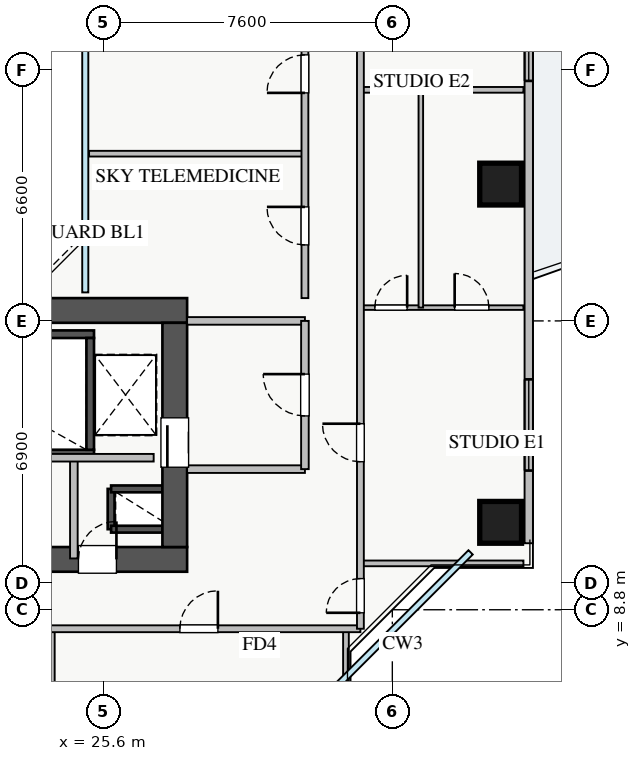
"""IFC4 building model, lengths in metres.
Left out: names, types, materials, properties, quantities, classifications, styles, units other than length and angle.
Written with IfcOpenShell. Run it as: python <this file> out.ifc"""

import sys

from ifc_helpers import new_model, si_unit, direction, frame, frame_2d, origin, origin_2d, place, context, subcontext, project, spatial, rectangle, extrude, source, transform, mapped, element, fill, save


model = new_model("IFC4")
c1 = context("Model", 3, precision=1e-05, world=origin(), true_north=direction((0.0, 1.0)))
c2 = subcontext(c1, "Body", "Model", "MODEL_VIEW")
j1 = project(units=[si_unit("LENGTHUNIT", "METRE"), si_unit("PLANEANGLEUNIT", "RADIAN")], contexts=[c1])
p1 = place(None, origin())
s1 = spatial("IfcSite", under=j1, at=p1, CompositionType="ELEMENT")
p2 = place(p1, origin())
s2 = spatial("IfcBuilding", under=s1, at=p2, CompositionType="ELEMENT")
p3 = place(p2, frame((0.0, 0.0, 106.75)))
s3 = spatial("IfcBuildingStorey", under=s2, at=p3, CompositionType="ELEMENT", Elevation=106.75)
p4 = place(p3, frame((25.8, 10.92, 0.0), z_axis=(0.0, 0.0, 1.0), x_axis=(0.0, 1.0, 0.0)))
e1 = element("IfcWall", 1, at=p4, inside=s3, PredefinedType="SHEAR", context=c2, shape_type="SweptSolid", body=[
    extrude(rectangle(XDim=1.06, YDim=0.18, at=frame_2d((0.53, 0.0))), origin(), (0.0, 0.0, 1.0), 3.07),
])
for number, where, z_axis, x_axis in (
    (2, (25.8, 11.98, 0.0), (0.0, 0.0, 1.0), (1.0, 0.0, 0.0)),
    (3, (25.8, 10.92, 0.0), (0.0, 0.0, 1.0), (1.0, 0.0, 0.0)),
):
    element("IfcWall", number, at=place(p3, frame(where, z_axis=z_axis, x_axis=x_axis)), inside=s3, PredefinedType="SHEAR", context=c2, shape_type="SweptSolid", body=[
        extrude(rectangle(XDim=1.35, YDim=0.18, at=frame_2d((0.675, 0.0))), origin(), (0.0, 0.0, 1.0), 3.07),
    ])
p5 = place(p3, frame((18.2, 12.91, 0.0), z_axis=(0.0, 0.0, 1.0), x_axis=(1.0, 0.0, 0.0)))
e4 = element("IfcWall", 4, at=p5, inside=s3, PredefinedType="SHEAR", context=c2, shape_type="SweptSolid", body=[
    extrude(rectangle(XDim=7.15, YDim=0.2, at=frame_2d((3.575, 0.0))), origin(), (0.0, 0.0, 1.0), 3.25),
])
p6 = place(p5, frame((0.35, 0.0, 0.0)))
e5 = element("IfcOpeningElement", 5, at=p6, cuts=e4, PredefinedType="OPENING", context=c2, shape_type="SweptSolid", body=[
    extrude(rectangle(XDim=1.1, YDim=2.05, at=frame_2d((0.55, 1.025))), frame((0.0, 0.11, 0.0), z_axis=(0.0, -1.0, 0.0), x_axis=(1.0, 0.0, 0.0)), (0.0, 0.0, 1.0), 0.22),
])
p7 = place(p3, frame((18.2, 16.05, 0.0), z_axis=(0.0, 0.0, 1.0), x_axis=(1.0, 0.0, 0.0)))
e6 = element("IfcWall", 6, at=p7, inside=s3, PredefinedType="SHEAR", context=c2, shape_type="SweptSolid", body=[
    extrude(rectangle(XDim=7.15, YDim=0.2, at=frame_2d((3.575, 0.0))), origin(), (0.0, 0.0, 1.0), 3.25),
])
p8 = place(p3, frame((25.25, 13.01, 0.0), z_axis=(0.0, 0.0, 1.0), x_axis=(0.0, 1.0, 0.0)))
e7 = element("IfcWall", 7, at=p8, inside=s3, PredefinedType="SHEAR", context=c2, shape_type="SweptSolid", body=[
    extrude(rectangle(XDim=2.94, YDim=0.2, at=frame_2d((1.47, 0.0))), origin(), (0.0, 0.0, 1.0), 3.25),
])
p9 = place(p3, frame((10.2, 10.125, 0.0), z_axis=(0.0, 0.0, 1.0), x_axis=(1.0, 0.0, 0.0)))
e8 = element("IfcWall", 8, at=p9, inside=s3, PredefinedType="SHEAR", context=c2, shape_type="SweptSolid", body=[
    extrude(rectangle(XDim=17.6, YDim=0.65, at=frame_2d((8.8, 0.0))), origin(), (0.0, 0.0, 1.0), 3.25),
])
p10 = place(p9, frame((1.15, 0.0, 0.0)))
e9 = element("IfcOpeningElement", 9, at=p10, cuts=e8, PredefinedType="OPENING", context=c2, shape_type="SweptSolid", body=[
    extrude(rectangle(XDim=1.1, YDim=2.05, at=frame_2d((0.55, 1.025))), frame((0.0, 0.335, 0.0), z_axis=(0.0, -1.0, 0.0), x_axis=(1.0, 0.0, 0.0)), (0.0, 0.0, 1.0), 0.67),
])
p11 = place(p9, frame((8.3, 0.0, 0.0)))
e10 = element("IfcOpeningElement", 10, at=p11, cuts=e8, PredefinedType="OPENING", context=c2, shape_type="SweptSolid", body=[
    extrude(rectangle(XDim=1.1, YDim=2.05, at=frame_2d((0.55, 1.025))), frame((0.0, 0.335, 0.0), z_axis=(0.0, -1.0, 0.0), x_axis=(1.0, 0.0, 0.0)), (0.0, 0.0, 1.0), 0.67),
])
p12 = place(p9, frame((4.9, 0.0, 0.0)))
e11 = element("IfcOpeningElement", 11, at=p12, cuts=e8, PredefinedType="OPENING", context=c2, shape_type="SweptSolid", body=[
    extrude(rectangle(XDim=1.1, YDim=2.05, at=frame_2d((0.55, 1.025))), frame((0.0, 0.335, 0.0), z_axis=(0.0, -1.0, 0.0), x_axis=(1.0, 0.0, 0.0)), (0.0, 0.0, 1.0), 0.67),
])
p13 = place(p9, frame((14.74, 0.0, 0.0)))
e12 = element("IfcOpeningElement", 12, at=p13, cuts=e8, PredefinedType="OPENING", context=c2, shape_type="SweptSolid", body=[
    extrude(rectangle(XDim=1.0, YDim=2.05, at=frame_2d((0.5, 1.025))), frame((0.0, 0.335, 0.0), z_axis=(0.0, -1.0, 0.0), x_axis=(1.0, 0.0, 0.0)), (0.0, 0.0, 1.0), 0.67),
])
p14 = place(p9, frame((11.67, 0.0, 0.0)))
e13 = element("IfcOpeningElement", 13, at=p14, cuts=e8, PredefinedType="OPENING", context=c2, shape_type="SweptSolid", body=[
    extrude(rectangle(XDim=1.0, YDim=2.05, at=frame_2d((0.5, 1.025))), frame((0.0, 0.335, 0.0), z_axis=(0.0, -1.0, 0.0), x_axis=(1.0, 0.0, 0.0)), (0.0, 0.0, 1.0), 0.67),
])
p15 = place(p3, frame((10.2, 16.675, 0.0), z_axis=(0.0, 0.0, 1.0), x_axis=(1.0, 0.0, 0.0)))
e14 = element("IfcWall", 14, at=p15, inside=s3, PredefinedType="SHEAR", context=c2, shape_type="SweptSolid", body=[
    extrude(rectangle(XDim=17.6, YDim=0.65, at=frame_2d((8.8, 0.0))), origin(), (0.0, 0.0, 1.0), 3.25),
])
p16 = place(p3, frame((27.475, 10.45, 0.0), z_axis=(0.0, 0.0, 1.0), x_axis=(0.0, 1.0, 0.0)))
e15 = element("IfcWall", 15, at=p16, inside=s3, PredefinedType="SHEAR", context=c2, shape_type="SweptSolid", body=[
    extrude(rectangle(XDim=5.9, YDim=0.65, at=frame_2d((2.95, 0.0))), origin(), (0.0, 0.0, 1.0), 3.25),
])
p17 = place(p16, frame((2.1, 0.0, 0.0)))
e16 = element("IfcOpeningElement", 16, at=p17, cuts=e15, PredefinedType="OPENING", context=c2, shape_type="SweptSolid", body=[
    extrude(rectangle(XDim=1.3, YDim=2.05, at=frame_2d((0.65, 1.025))), frame((0.0, 0.335, 0.0), z_axis=(0.0, -1.0, 0.0), x_axis=(1.0, 0.0, 0.0)), (0.0, 0.0, 1.0), 0.67),
])
m1 = source(origin(), c2, "Body", "SweptSolid", [
    extrude(rectangle(XDim=1.1, YDim=1.1, at=origin_2d()), origin(), (0.0, 0.0, 1.0), 3.25),
])
for number, where, z_axis, x_axis in (
    (17, (36.05, 11.1, 0.0), (0.0, 0.0, 1.0), (1.0, 0.0, 0.0)),
    (18, (36.05, 20.0, 0.0), (0.0, 0.0, 1.0), (1.0, 0.0, 0.0)),
):
    element("IfcColumn", number, at=place(p3, frame(where, z_axis=z_axis, x_axis=x_axis)), inside=s3, PredefinedType="COLUMN", context=c2, shape_type="MappedRepresentation", body=[
        mapped(m1, transform((0.0, 0.0, 0.0), x_axis=(1.0, 0.0, 0.0), y_axis=(0.0, 1.0, 0.0), z_axis=(0.0, 0.0, 1.0), scale=1.0)),
    ])
p18 = place(p3, frame((36.79, 10.55, 0.0), z_axis=(0.0, 0.0, 1.0), x_axis=(0.0, 1.0, 0.0)))
e19 = element("IfcWall", 19, at=p18, inside=s3, PredefinedType="STANDARD", context=c2, shape_type="SweptSolid", body=[
    extrude(rectangle(XDim=24.9, YDim=0.22, at=frame_2d((12.45, 0.0))), origin(), (0.0, 0.0, 1.0), 2.61),
])
p19 = place(p18, frame((13.3, 0.0, 0.0)))
e20 = element("IfcOpeningElement", 20, at=p19, cuts=e19, PredefinedType="OPENING", context=c2, shape_type="SweptSolid", body=[
    extrude(rectangle(XDim=1.2, YDim=2.1, at=frame_2d((0.6, 1.05))), frame((0.0, 0.12, 0.0), z_axis=(0.0, -1.0, 0.0), x_axis=(1.0, 0.0, 0.0)), (0.0, 0.0, 1.0), 0.24),
])
p20 = place(p18, frame((1.912, 0.0, 0.9)))
e21 = element("IfcOpeningElement", 21, at=p20, cuts=e19, PredefinedType="OPENING", context=c2, shape_type="SweptSolid", body=[
    extrude(rectangle(XDim=2.4, YDim=1.48, at=frame_2d((1.2, 0.74))), frame((0.0, 0.12, 0.0), z_axis=(0.0, -1.0, 0.0), x_axis=(1.0, 0.0, 0.0)), (0.0, 0.0, 1.0), 0.24),
])
p21 = place(p18, frame((20.737, 0.0, 0.9)))
e22 = element("IfcOpeningElement", 22, at=p21, cuts=e19, PredefinedType="OPENING", context=c2, shape_type="SweptSolid", body=[
    extrude(rectangle(XDim=2.1, YDim=1.48, at=frame_2d((1.05, 0.74))), frame((0.0, 0.12, 0.0), z_axis=(0.0, -1.0, 0.0), x_axis=(1.0, 0.0, 0.0)), (0.0, 0.0, 1.0), 0.24),
])
p22 = place(p18, frame((12.165, 0.0, 0.9)))
e23 = element("IfcOpeningElement", 23, at=p22, cuts=e19, PredefinedType="OPENING", context=c2, shape_type="SweptSolid", body=[
    extrude(rectangle(XDim=0.9, YDim=1.2, at=frame_2d((0.45, 0.6))), frame((0.0, 0.12, 0.0), z_axis=(0.0, -1.0, 0.0), x_axis=(1.0, 0.0, 0.0)), (0.0, 0.0, 1.0), 0.24),
])
for number, where, z_axis, x_axis in (
    (24, (27.8, 16.4, 0.0), (0.0, 0.0, 1.0), (1.0, 0.0, 0.0)),
    (25, (27.8, 12.5, 0.0), (0.0, 0.0, 1.0), (1.0, 0.0, 0.0)),
):
    element("IfcWall", number, at=place(p3, frame(where, z_axis=z_axis, x_axis=x_axis)), inside=s3, PredefinedType="PARTITIONING", context=c2, shape_type="SweptSolid", body=[
        extrude(rectangle(XDim=3.1, YDim=0.2, at=frame_2d((1.55, 0.0))), origin(), (0.0, 0.0, 1.0), 3.07),
    ])
p23 = place(p3, frame((30.9, 12.5, 0.0), z_axis=(0.0, 0.0, 1.0), x_axis=(0.0, 1.0, 0.0)))
e26 = element("IfcWall", 26, at=p23, inside=s3, PredefinedType="PARTITIONING", context=c2, shape_type="SweptSolid", body=[
    extrude(rectangle(XDim=3.9, YDim=0.2, at=frame_2d((1.95, 0.0))), origin(), (0.0, 0.0, 1.0), 3.07),
])
p24 = place(p23, frame((1.4, 0.0, 0.0)))
e27 = element("IfcOpeningElement", 27, at=p24, cuts=e26, PredefinedType="OPENING", context=c2, shape_type="SweptSolid", body=[
    extrude(rectangle(XDim=1.1, YDim=2.05, at=frame_2d((0.55, 1.025))), frame((0.0, 0.11, 0.0), z_axis=(0.0, -1.0, 0.0), x_axis=(1.0, 0.0, 0.0)), (0.0, 0.0, 1.0), 0.22),
])
p25 = place(p3, frame((24.82, 10.15, 0.0), z_axis=(0.0, 0.0, 1.0), x_axis=(0.0, 1.0, 0.0)))
e28 = element("IfcWall", 28, at=p25, inside=s3, PredefinedType="PARTITIONING", context=c2, shape_type="SweptSolid", body=[
    extrude(rectangle(XDim=2.65, YDim=0.2, at=frame_2d((1.325, 0.0))), origin(), (0.0, 0.0, 1.0), 3.07),
])
p26 = place(p3, frame((21.75, 12.8, 0.0), z_axis=(0.0, 0.0, 1.0), x_axis=(1.0, 0.0, 0.0)))
e29 = element("IfcWall", 29, at=p26, inside=s3, PredefinedType="PARTITIONING", context=c2, shape_type="SweptSolid", body=[
    extrude(rectangle(XDim=5.17, YDim=0.2, at=frame_2d((2.585, 0.0))), origin(), (0.0, 0.0, 1.0), 3.07),
])
for number, where, z_axis, x_axis in (
    (30, (24.24, 5.35, 0.0), (0.0, 0.0, 1.0), (0.0, 1.0, 0.0)),
    (31, (31.98, 5.35, 0.0), (0.0, 0.0, 1.0), (0.0, 1.0, 0.0)),
):
    element("IfcWall", number, at=place(p3, frame(where, z_axis=z_axis, x_axis=x_axis)), inside=s3, PredefinedType="PARTITIONING", context=c2, shape_type="SweptSolid", body=[
        extrude(rectangle(XDim=2.95, YDim=0.15, at=frame_2d((1.475, 0.0))), origin(), (0.0, 0.0, 1.0), 3.07),
    ])
p27 = place(p3, frame((8.75, 8.3, 0.0), z_axis=(0.0, 0.0, 1.0), x_axis=(1.0, 0.0, 0.0)))
e32 = element("IfcWall", 32, at=p27, inside=s3, PredefinedType="PARTITIONING", context=c2, shape_type="SweptSolid", body=[
    extrude(rectangle(XDim=23.61, YDim=0.18, at=frame_2d((11.805, 0.0))), origin(), (0.0, 0.0, 1.0), 3.07),
])
p28 = place(p27, frame((3.37, 0.0, 0.0)))
e33 = element("IfcOpeningElement", 33, at=p28, cuts=e32, PredefinedType="OPENING", context=c2, shape_type="SweptSolid", body=[
    extrude(rectangle(XDim=1.0, YDim=2.05, at=frame_2d((0.5, 1.025))), frame((0.0, 0.1, 0.0), z_axis=(0.0, -1.0, 0.0), x_axis=(1.0, 0.0, 0.0)), (0.0, 0.0, 1.0), 0.2),
])
p29 = place(p27, frame((11.115, 0.0, 0.0)))
e34 = element("IfcOpeningElement", 34, at=p29, cuts=e32, PredefinedType="OPENING", context=c2, shape_type="SweptSolid", body=[
    extrude(rectangle(XDim=1.0, YDim=2.05, at=frame_2d((0.5, 1.025))), frame((0.0, 0.1, 0.0), z_axis=(0.0, -1.0, 0.0), x_axis=(1.0, 0.0, 0.0)), (0.0, 0.0, 1.0), 0.2),
])
p30 = place(p27, frame((18.86, 0.0, 0.0)))
e35 = element("IfcOpeningElement", 35, at=p30, cuts=e32, PredefinedType="OPENING", context=c2, shape_type="SweptSolid", body=[
    extrude(rectangle(XDim=1.0, YDim=2.05, at=frame_2d((0.5, 1.025))), frame((0.0, 0.1, 0.0), z_axis=(0.0, -1.0, 0.0), x_axis=(1.0, 0.0, 0.0)), (0.0, 0.0, 1.0), 0.2),
])
p31 = place(p3, frame((32.36, 10.02, 0.0), z_axis=(0.0, 0.0, 1.0), x_axis=(1.0, 0.0, 0.0)))
e36 = element("IfcWall", 36, at=p31, inside=s3, PredefinedType="PARTITIONING", context=c2, shape_type="SweptSolid", body=[
    extrude(rectangle(XDim=4.29, YDim=0.15, at=frame_2d((2.145, 0.0))), origin(), (0.0, 0.0, 1.0), 3.07),
])
p32 = place(p3, frame((32.36, 16.75, 0.0), z_axis=(0.0, 0.0, 1.0), x_axis=(1.0, 0.0, 0.0)))
e37 = element("IfcWall", 37, at=p32, inside=s3, PredefinedType="PLUMBINGWALL", context=c2, shape_type="SweptSolid", body=[
    extrude(rectangle(XDim=4.29, YDim=0.12, at=frame_2d((2.145, 0.0))), origin(), (0.0, 0.0, 1.0), 3.07),
])
p33 = place(p32, frame((0.38, 0.0, 0.0)))
e38 = element("IfcOpeningElement", 38, at=p33, cuts=e37, PredefinedType="OPENING", context=c2, shape_type="SweptSolid", body=[
    extrude(rectangle(XDim=0.85, YDim=2.05, at=frame_2d((0.425, 1.025))), frame((0.0, 0.07, 0.0), z_axis=(0.0, -1.0, 0.0), x_axis=(1.0, 0.0, 0.0)), (0.0, 0.0, 1.0), 0.14),
])
p34 = place(p32, frame((2.48, 0.0, 0.0)))
e39 = element("IfcOpeningElement", 39, at=p34, cuts=e37, PredefinedType="OPENING", context=c2, shape_type="SweptSolid", body=[
    extrude(rectangle(XDim=0.9, YDim=2.05, at=frame_2d((0.45, 1.025))), frame((0.0, 0.07, 0.0), z_axis=(0.0, -1.0, 0.0), x_axis=(1.0, 0.0, 0.0)), (0.0, 0.0, 1.0), 0.14),
])
p35 = place(p3, frame((33.95, 16.75, 0.0), z_axis=(0.0, 0.0, 1.0), x_axis=(0.0, 1.0, 0.0)))
e40 = element("IfcWall", 40, at=p35, inside=s3, PredefinedType="PLUMBINGWALL", context=c2, shape_type="SweptSolid", body=[
    extrude(rectangle(XDim=5.73, YDim=0.12, at=frame_2d((2.865, 0.0))), origin(), (0.0, 0.0, 1.0), 3.07),
])
p36 = place(p3, frame((32.36, 22.48, 0.0), z_axis=(0.0, 0.0, 1.0), x_axis=(1.0, 0.0, 0.0)))
e41 = element("IfcWall", 41, at=p36, inside=s3, PredefinedType="PARTITIONING", context=c2, shape_type="SweptSolid", body=[
    extrude(rectangle(XDim=4.29, YDim=0.15, at=frame_2d((2.145, 0.0))), origin(), (0.0, 0.0, 1.0), 3.07),
])
p37 = place(p3, frame((32.36, 8.3, 0.0), z_axis=(0.0, 0.0, 1.0), x_axis=(0.0, 1.0, 0.0)))
e42 = element("IfcWall", 42, at=p37, inside=s3, PredefinedType="PARTITIONING", context=c2, shape_type="SweptSolid", body=[
    extrude(rectangle(XDim=29.4, YDim=0.18, at=frame_2d((14.7, 0.0))), origin(), (0.0, 0.0, 1.0), 3.07),
])
p38 = place(p37, frame((28.08, 0.0, 0.0)))
e43 = element("IfcOpeningElement", 43, at=p38, cuts=e42, PredefinedType="OPENING", context=c2, shape_type="SweptSolid", body=[
    extrude(rectangle(XDim=0.9, YDim=2.05, at=frame_2d((0.45, 1.025))), frame((0.0, 0.1, 0.0), z_axis=(0.0, -1.0, 0.0), x_axis=(1.0, 0.0, 0.0)), (0.0, 0.0, 1.0), 0.2),
])
p39 = place(p37, frame((0.42, 0.0, 0.0)))
e44 = element("IfcOpeningElement", 44, at=p39, cuts=e42, PredefinedType="OPENING", context=c2, shape_type="SweptSolid", body=[
    extrude(rectangle(XDim=0.9, YDim=2.05, at=frame_2d((0.45, 1.025))), frame((0.0, 0.1, 0.0), z_axis=(0.0, -1.0, 0.0), x_axis=(1.0, 0.0, 0.0)), (0.0, 0.0, 1.0), 0.2),
])
p40 = place(p37, frame((4.395, 0.0, 0.0)))
e45 = element("IfcOpeningElement", 45, at=p40, cuts=e42, PredefinedType="OPENING", context=c2, shape_type="SweptSolid", body=[
    extrude(rectangle(XDim=1.0, YDim=2.05, at=frame_2d((0.5, 1.025))), frame((0.0, 0.1, 0.0), z_axis=(0.0, -1.0, 0.0), x_axis=(1.0, 0.0, 0.0)), (0.0, 0.0, 1.0), 0.2),
])
p41 = place(p37, frame((17.135, 0.0, 0.0)))
e46 = element("IfcOpeningElement", 46, at=p41, cuts=e42, PredefinedType="OPENING", context=c2, shape_type="SweptSolid", body=[
    extrude(rectangle(XDim=1.0, YDim=2.05, at=frame_2d((0.5, 1.025))), frame((0.0, 0.1, 0.0), z_axis=(0.0, -1.0, 0.0), x_axis=(1.0, 0.0, 0.0)), (0.0, 0.0, 1.0), 0.2),
])
p42 = place(p3, frame((25.22, 20.8, 0.0), z_axis=(0.0, 0.0, 1.0), x_axis=(1.0, 0.0, 0.0)))
e47 = element("IfcWall", 47, at=p42, inside=s3, PredefinedType="PARTITIONING", context=c2, shape_type="SweptSolid", body=[
    extrude(rectangle(XDim=5.68, YDim=0.15, at=frame_2d((2.84, 0.0))), origin(), (0.0, 0.0, 1.0), 3.07),
])
p43 = place(p3, frame((30.9, 17.0, 0.0), z_axis=(0.0, 0.0, 1.0), x_axis=(0.0, 1.0, 0.0)))
e48 = element("IfcWall", 48, at=p43, inside=s3, PredefinedType="PARTITIONING", context=c2, shape_type="SweptSolid", body=[
    extrude(rectangle(XDim=12.0, YDim=0.18, at=frame_2d((6.0, 0.0))), origin(), (0.0, 0.0, 1.0), 3.07),
])
p44 = place(p43, frame((1.4, 0.0, 0.0)))
e49 = element("IfcOpeningElement", 49, at=p44, cuts=e48, PredefinedType="OPENING", context=c2, shape_type="SweptSolid", body=[
    extrude(rectangle(XDim=1.0, YDim=2.05, at=frame_2d((0.5, 1.025))), frame((0.0, 0.1, 0.0), z_axis=(0.0, -1.0, 0.0), x_axis=(1.0, 0.0, 0.0)), (0.0, 0.0, 1.0), 0.2),
])
p45 = place(p43, frame((5.4, 0.0, 0.0)))
e50 = element("IfcOpeningElement", 50, at=p45, cuts=e48, PredefinedType="OPENING", context=c2, shape_type="SweptSolid", body=[
    extrude(rectangle(XDim=1.0, YDim=2.05, at=frame_2d((0.5, 1.025))), frame((0.0, 0.1, 0.0), z_axis=(0.0, -1.0, 0.0), x_axis=(1.0, 0.0, 0.0)), (0.0, 0.0, 1.0), 0.2),
])
p46 = place(p43, frame((9.4, 0.0, 0.0)))
e51 = element("IfcOpeningElement", 51, at=p46, cuts=e48, PredefinedType="OPENING", context=c2, shape_type="SweptSolid", body=[
    extrude(rectangle(XDim=1.0, YDim=2.05, at=frame_2d((0.5, 1.025))), frame((0.0, 0.1, 0.0), z_axis=(0.0, -1.0, 0.0), x_axis=(1.0, 0.0, 0.0)), (0.0, 0.0, 1.0), 0.2),
])
m2 = source(origin(), c2, "Body", "SweptSolid", [
    extrude(rectangle(XDim=2.4, YDim=1.48, at=frame_2d((1.2, 0.74))), frame((0.0, 0.03, 0.0), z_axis=(0.0, -1.0, 0.0), x_axis=(1.0, 0.0, 0.0)), (0.0, 0.0, 1.0), 0.06),
])
p47 = place(p20, origin())
e52 = element("IfcWindow", 52, at=p47, inside=s3, PartitioningType="TRIPLE_PANEL_VERTICAL", PredefinedType="WINDOW", context=c2, shape_type="MappedRepresentation", body=[
    mapped(m2, transform((0.0, 0.0, 0.0), x_axis=(1.0, 0.0, 0.0), y_axis=(0.0, 1.0, 0.0), z_axis=(0.0, 0.0, 1.0), scale=1.0)),
])
fill(e21, e52)
m3 = source(origin(), c2, "Body", "SweptSolid", [
    extrude(rectangle(XDim=1.3, YDim=2.05, at=frame_2d((0.65, 1.025))), frame((0.0, 0.025, 0.0), z_axis=(0.0, -1.0, 0.0), x_axis=(1.0, 0.0, 0.0)), (0.0, 0.0, 1.0), 0.05),
])
p48 = place(p17, origin())
e53 = element("IfcDoor", 53, at=p48, inside=s3, OperationType="SLIDING_TO_RIGHT", PredefinedType="DOOR", context=c2, shape_type="MappedRepresentation", body=[
    mapped(m3, transform((0.0, 0.0, 0.0), x_axis=(1.0, 0.0, 0.0), y_axis=(0.0, 1.0, 0.0), z_axis=(0.0, 0.0, 1.0), scale=1.0)),
])
fill(e16, e53)
m4 = source(origin(), c2, "Body", "SweptSolid", [
    extrude(rectangle(XDim=1.0, YDim=2.05, at=frame_2d((0.5, 1.025))), frame((0.0, 0.025, 0.0), z_axis=(0.0, -1.0, 0.0), x_axis=(1.0, 0.0, 0.0)), (0.0, 0.0, 1.0), 0.05),
])
p49 = place(p13, origin())
e54 = element("IfcDoor", 54, at=p49, inside=s3, OperationType="SINGLE_SWING_RIGHT", PredefinedType="DOOR", context=c2, shape_type="MappedRepresentation", body=[
    mapped(m4, transform((0.0, 0.0, 0.0), x_axis=(1.0, 0.0, 0.0), y_axis=(0.0, 1.0, 0.0), z_axis=(0.0, 0.0, 1.0), scale=1.0)),
])
fill(e12, e54)
m5 = source(origin(), c2, "Body", "SweptSolid", [
    extrude(rectangle(XDim=1.1, YDim=2.05, at=frame_2d((0.55, 1.025))), frame((0.0, 0.025, 0.0), z_axis=(0.0, -1.0, 0.0), x_axis=(1.0, 0.0, 0.0)), (0.0, 0.0, 1.0), 0.05),
])
p50 = place(p24, origin())
e55 = element("IfcDoor", 55, at=p50, inside=s3, OperationType="SINGLE_SWING_RIGHT", PredefinedType="DOOR", context=c2, shape_type="MappedRepresentation", body=[
    mapped(m5, transform((0.0, 0.0, 0.0), x_axis=(1.0, 0.0, 0.0), y_axis=(0.0, 1.0, 0.0), z_axis=(0.0, 0.0, 1.0), scale=1.0)),
])
fill(e27, e55)
p51 = place(p30, origin())
e56 = element("IfcDoor", 56, at=p51, inside=s3, OperationType="SINGLE_SWING_RIGHT", PredefinedType="DOOR", context=c2, shape_type="MappedRepresentation", body=[
    mapped(m4, transform((0.0, 0.0, 0.0), x_axis=(1.0, 0.0, 0.0), y_axis=(0.0, 1.0, 0.0), z_axis=(0.0, 0.0, 1.0), scale=1.0)),
])
fill(e35, e56)
m6 = source(origin(), c2, "Body", "SweptSolid", [
    extrude(rectangle(XDim=0.85, YDim=2.05, at=frame_2d((0.425, 1.025))), frame((0.0, 0.025, 0.0), z_axis=(0.0, -1.0, 0.0), x_axis=(1.0, 0.0, 0.0)), (0.0, 0.0, 1.0), 0.05),
])
p52 = place(p33, origin())
e57 = element("IfcDoor", 57, at=p52, inside=s3, OperationType="SINGLE_SWING_RIGHT", PredefinedType="DOOR", context=c2, shape_type="MappedRepresentation", body=[
    mapped(m6, transform((0.0, 0.0, 0.0), x_axis=(1.0, 0.0, 0.0), y_axis=(0.0, 1.0, 0.0), z_axis=(0.0, 0.0, 1.0), scale=1.0)),
])
fill(e38, e57)
m7 = source(origin(), c2, "Body", "SweptSolid", [
    extrude(rectangle(XDim=0.9, YDim=2.05, at=frame_2d((0.45, 1.025))), frame((0.0, 0.025, 0.0), z_axis=(0.0, -1.0, 0.0), x_axis=(1.0, 0.0, 0.0)), (0.0, 0.0, 1.0), 0.05),
])
p53 = place(p34, origin())
e58 = element("IfcDoor", 58, at=p53, inside=s3, OperationType="SINGLE_SWING_LEFT", PredefinedType="DOOR", context=c2, shape_type="MappedRepresentation", body=[
    mapped(m7, transform((0.0, 0.0, 0.0), x_axis=(1.0, 0.0, 0.0), y_axis=(0.0, 1.0, 0.0), z_axis=(0.0, 0.0, 1.0), scale=1.0)),
])
fill(e39, e58)
p54 = place(p39, origin())
e59 = element("IfcDoor", 59, at=p54, inside=s3, OperationType="SINGLE_SWING_LEFT", PredefinedType="DOOR", context=c2, shape_type="MappedRepresentation", body=[
    mapped(m7, transform((0.0, 0.0, 0.0), x_axis=(1.0, 0.0, 0.0), y_axis=(0.0, 1.0, 0.0), z_axis=(0.0, 0.0, 1.0), scale=1.0)),
])
fill(e44, e59)
p55 = place(p40, origin())
e60 = element("IfcDoor", 60, at=p55, inside=s3, OperationType="SINGLE_SWING_RIGHT", PredefinedType="DOOR", context=c2, shape_type="MappedRepresentation", body=[
    mapped(m4, transform((0.0, 0.0, 0.0), x_axis=(1.0, 0.0, 0.0), y_axis=(0.0, 1.0, 0.0), z_axis=(0.0, 0.0, 1.0), scale=1.0)),
])
fill(e45, e60)
p56 = place(p44, origin())
e61 = element("IfcDoor", 61, at=p56, inside=s3, OperationType="SINGLE_SWING_RIGHT", PredefinedType="DOOR", context=c2, shape_type="MappedRepresentation", body=[
    mapped(m4, transform((0.0, 0.0, 0.0), x_axis=(1.0, 0.0, 0.0), y_axis=(0.0, 1.0, 0.0), z_axis=(0.0, 0.0, 1.0), scale=1.0)),
])
fill(e49, e61)
p57 = place(p45, origin())
e62 = element("IfcDoor", 62, at=p57, inside=s3, OperationType="SINGLE_SWING_LEFT", PredefinedType="DOOR", context=c2, shape_type="MappedRepresentation", body=[
    mapped(m4, transform((0.0, 0.0, 0.0), x_axis=(1.0, 0.0, 0.0), y_axis=(0.0, 1.0, 0.0), z_axis=(0.0, 0.0, 1.0), scale=1.0)),
])
fill(e50, e62)
m8 = source(origin(), c2, "Body", "SweptSolid", [
    extrude(rectangle(XDim=0.9, YDim=1.2, at=frame_2d((0.45, 0.6))), frame((0.0, 0.03, 0.0), z_axis=(0.0, -1.0, 0.0), x_axis=(1.0, 0.0, 0.0)), (0.0, 0.0, 1.0), 0.06),
])
p58 = place(p22, origin())
e63 = element("IfcWindow", 63, at=p58, inside=s3, PartitioningType="SINGLE_PANEL", PredefinedType="WINDOW", context=c2, shape_type="MappedRepresentation", body=[
    mapped(m8, transform((0.0, 0.0, 0.0), x_axis=(1.0, 0.0, 0.0), y_axis=(0.0, 1.0, 0.0), z_axis=(0.0, 0.0, 1.0), scale=1.0)),
])
fill(e23, e63)
save(model, sys.argv[1])
